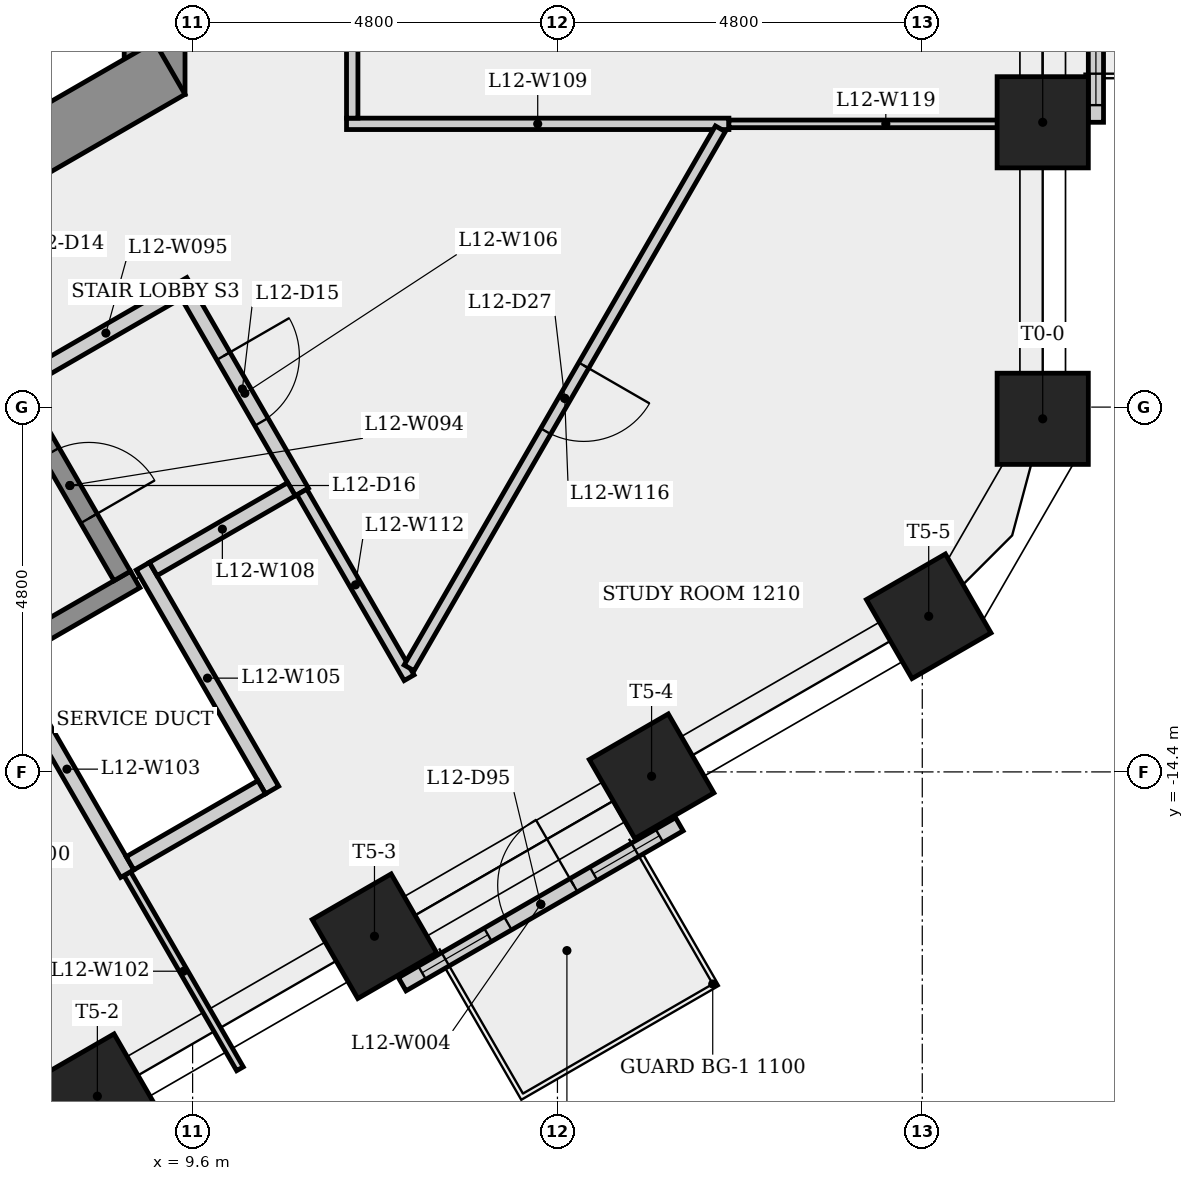
"""IFC4 building model, lengths in metres.
Left out: names, types, materials, properties, quantities, classifications, styles, units other than length and angle.
Written with IfcOpenShell. Run it as: python <this file> out.ifc"""

import sys

from ifc_helpers import new_model, si_unit, direction, frame, frame_2d, origin, origin_2d, place, context, subcontext, project, spatial, rectangle, extrude, element, fill, save


model = new_model("IFC4")
c1 = context("Model", 3, precision=1e-05, world=origin(), true_north=direction((0.0, 1.0)))
c2 = subcontext(c1, "Body", "Model", "MODEL_VIEW")
j1 = project(units=[si_unit("LENGTHUNIT", "METRE"), si_unit("PLANEANGLEUNIT", "RADIAN")], contexts=[c1])
p1 = place(None, origin())
s1 = spatial("IfcSite", under=j1, at=p1, CompositionType="ELEMENT")
p2 = place(p1, origin())
s2 = spatial("IfcBuilding", under=s1, at=p2, CompositionType="ELEMENT")
p3 = place(p2, frame((0.0, 0.0, 49.3)))
s3 = spatial("IfcBuildingStorey", under=s2, at=p3, CompositionType="ELEMENT", Elevation=49.3)
p4 = place(p3, frame((9.1, -5.485, 0.0), z_axis=(0.0, 0.0, 1.0), x_axis=(0.0, 1.0, 0.0)))
e1 = element("IfcWall", 1, at=p4, inside=s3, PredefinedType="SHEAR", context=c2, shape_type="SweptSolid", body=[
    extrude(rectangle(XDim=10.97, YDim=0.8, at=frame_2d((5.485, 0.0))), origin(), (0.0, 0.0, 1.0), 3.4),
])
p5 = place(p4, frame((4.685, 0.0, 0.0)))
e2 = element("IfcOpeningElement", 2, at=p5, cuts=e1, PredefinedType="OPENING", context=c2, shape_type="SweptSolid", body=[
    extrude(rectangle(XDim=1.6, YDim=2.1, at=frame_2d((0.8, 1.05))), frame((0.0, 0.41, 0.0), z_axis=(0.0, -1.0, 0.0), x_axis=(1.0, 0.0, 0.0)), (0.0, 0.0, 1.0), 0.82),
])
p6 = place(p3, frame((-0.2, -10.623, 0.0), z_axis=(0.0, 0.0, 1.0), x_axis=(0.866023993627, 0.500002442456, 0.0)))
e3 = element("IfcWall", 3, at=p6, inside=s3, PredefinedType="SHEAR", context=c2, shape_type="SweptSolid", body=[
    extrude(rectangle(XDim=10.97, YDim=0.8, at=frame_2d((5.485, 0.0))), origin(), (0.0, 0.0, 1.0), 3.4),
])
p7 = place(p6, frame((7.108, 0.0, 0.0)))
e4 = element("IfcOpeningElement", 4, at=p7, cuts=e3, PredefinedType="OPENING", context=c2, shape_type="SweptSolid", body=[
    extrude(rectangle(XDim=0.9, YDim=2.1, at=frame_2d((0.45, 1.05))), frame((0.0, 0.41, 0.0), z_axis=(0.0, -1.0, 0.0), x_axis=(1.0, 0.0, 0.0)), (0.0, 0.0, 1.0), 0.82),
])
for number, where, z_axis, x_axis in (
    (5, (20.785, -9.754, 0.0), (0.0, 0.0, 1.0), (1.0, 0.0, 0.0)),
    (6, (20.785, -5.852, 0.0), (0.0, 0.0, 1.0), (1.0, 0.0, 0.0)),
    (7, (8.347, -18.667, 0.0), (0.0, 0.0, 1.0), (0.5, -0.866, 0.0)),
    (8, (11.993, -16.562, 0.0), (0.0, 0.0, 1.0), (0.5, -0.866, 0.0)),
    (9, (15.639, -14.457, 0.0), (0.0, 0.0, 1.0), (0.5, -0.866, 0.0)),
    (10, (19.285, -12.352, 0.0), (0.0, 0.0, 1.0), (0.5, -0.866, 0.0)),
):
    element("IfcColumn", number, at=place(p3, frame(where, z_axis=z_axis, x_axis=x_axis)), inside=s3, PredefinedType="COLUMN", context=c2, shape_type="SweptSolid", body=[
        extrude(rectangle(XDim=1.2, YDim=1.2, at=origin_2d()), origin(), (0.0, 0.0, 1.0), 3.4),
    ])
p8 = place(p3, frame((12.358, -17.194, 0.0), z_axis=(0.0, 0.0, 1.0), x_axis=(0.866029143232, 0.499993523031, 0.0)))
e11 = element("IfcWall", 11, at=p8, inside=s3, PredefinedType="SOLIDWALL", context=c2, shape_type="SweptSolid", body=[
    extrude(rectangle(XDim=4.21, YDim=0.2, at=frame_2d((2.105, 0.0))), origin(), (0.0, 0.0, 1.0), 3.4),
])
p9 = place(p8, frame((1.605, 0.0, 0.0)))
e12 = element("IfcOpeningElement", 12, at=p9, cuts=e11, PredefinedType="OPENING", context=c2, shape_type="SweptSolid", body=[
    extrude(rectangle(XDim=1.0, YDim=2.4, at=frame_2d((0.5, 1.2))), frame((0.0, 0.11, 0.0), z_axis=(0.0, -1.0, 0.0), x_axis=(1.0, 0.0, 0.0)), (0.0, 0.0, 1.0), 0.22),
])
p10 = place(p8, frame((0.302, 0.0, 0.9)))
e13 = element("IfcOpeningElement", 13, at=p10, cuts=e11, PredefinedType="OPENING", context=c2, shape_type="SweptSolid", body=[
    extrude(rectangle(XDim=1.0, YDim=1.5, at=frame_2d((0.5, 0.75))), frame((0.0, 0.11, 0.0), z_axis=(0.0, -1.0, 0.0), x_axis=(1.0, 0.0, 0.0)), (0.0, 0.0, 1.0), 0.22),
])
p11 = place(p8, frame((2.907, 0.0, 0.9)))
e14 = element("IfcOpeningElement", 14, at=p11, cuts=e11, PredefinedType="OPENING", context=c2, shape_type="SweptSolid", body=[
    extrude(rectangle(XDim=1.0, YDim=1.5, at=frame_2d((0.5, 0.75))), frame((0.0, 0.11, 0.0), z_axis=(0.0, -1.0, 0.0), x_axis=(1.0, 0.0, 0.0)), (0.0, 0.0, 1.0), 0.22),
])
p12 = place(p3, frame((21.485, -5.852, 0.0), z_axis=(0.0, 0.0, 1.0), x_axis=(0.0, 1.0, 0.0)))
e15 = element("IfcWall", 15, at=p12, inside=s3, PredefinedType="SOLIDWALL", context=c2, shape_type="SweptSolid", body=[
    extrude(rectangle(XDim=3.902, YDim=0.2, at=frame_2d((1.951, 0.0))), origin(), (0.0, 0.0, 1.0), 3.4),
])
p13 = place(p12, frame((1.451, 0.0, 0.0)))
e16 = element("IfcOpeningElement", 16, at=p13, cuts=e15, PredefinedType="OPENING", context=c2, shape_type="SweptSolid", body=[
    extrude(rectangle(XDim=1.0, YDim=2.4, at=frame_2d((0.5, 1.2))), frame((0.0, 0.11, 0.0), z_axis=(0.0, -1.0, 0.0), x_axis=(1.0, 0.0, 0.0)), (0.0, 0.0, 1.0), 0.22),
])
p14 = place(p12, frame((0.226, 0.0, 0.9)))
e17 = element("IfcOpeningElement", 17, at=p14, cuts=e15, PredefinedType="OPENING", context=c2, shape_type="SweptSolid", body=[
    extrude(rectangle(XDim=1.0, YDim=1.5, at=frame_2d((0.5, 0.75))), frame((0.0, 0.11, 0.0), z_axis=(0.0, -1.0, 0.0), x_axis=(1.0, 0.0, 0.0)), (0.0, 0.0, 1.0), 0.22),
])
p15 = place(p12, frame((2.677, 0.0, 0.9)))
e18 = element("IfcOpeningElement", 18, at=p15, cuts=e15, PredefinedType="OPENING", context=c2, shape_type="SweptSolid", body=[
    extrude(rectangle(XDim=1.0, YDim=1.5, at=frame_2d((0.5, 0.75))), frame((0.0, 0.11, 0.0), z_axis=(0.0, -1.0, 0.0), x_axis=(1.0, 0.0, 0.0)), (0.0, 0.0, 1.0), 0.22),
])
p16 = place(p3, frame((3.301, -15.068, 0.0), z_axis=(0.0, 0.0, 1.0), x_axis=(0.866035036182, 0.499983315828, 0.0)))
e19 = element("IfcWall", 19, at=p16, inside=s3, PredefinedType="SHEAR", context=c2, shape_type="SweptSolid", body=[
    extrude(rectangle(XDim=6.4, YDim=0.25, at=frame_2d((3.2, 0.0))), origin(), (0.0, 0.0, 1.0), 3.05),
])
p17 = place(p3, frame((7.298, -9.441, 0.0), z_axis=(0.0, 0.0, 1.0), x_axis=(0.500034990121, -0.866005201286, 0.0)))
e20 = element("IfcWall", 20, at=p17, inside=s3, PredefinedType="SHEAR", context=c2, shape_type="SweptSolid", body=[
    extrude(rectangle(XDim=2.75, YDim=0.25, at=frame_2d((1.375, 0.0))), origin(), (0.0, 0.0, 1.0), 3.05),
])
p18 = place(p17, frame((0.875, 0.0, 0.0)))
e21 = element("IfcOpeningElement", 21, at=p18, cuts=e20, PredefinedType="OPENING", context=c2, shape_type="SweptSolid", body=[
    extrude(rectangle(XDim=1.0, YDim=2.1, at=frame_2d((0.5, 1.05))), frame((0.0, 0.135, 0.0), z_axis=(0.0, -1.0, 0.0), x_axis=(1.0, 0.0, 0.0)), (0.0, 0.0, 1.0), 0.27),
])
p19 = place(p3, frame((7.344, -9.27, 0.0), z_axis=(0.0, 0.0, 1.0), x_axis=(0.866005588531, 0.500034319456, 0.0)))
e22 = element("IfcWall", 22, at=p19, inside=s3, PredefinedType="PARTITIONING", context=c2, shape_type="SweptSolid", body=[
    extrude(rectangle(XDim=2.575, YDim=0.2, at=frame_2d((1.288, 0.0))), origin(), (0.0, 0.0, 1.0), 3.05),
])
p20 = place(p3, frame((8.74, -15.738, 0.0), z_axis=(0.0, 0.0, 1.0), x_axis=(0.500052637874, -0.865995011161, 0.0)))
e23 = element("IfcWall", 23, at=p20, inside=s3, PredefinedType="PARTITIONING", context=c2, shape_type="SweptSolid", body=[
    extrude(rectangle(XDim=2.966, YDim=0.1, at=frame_2d((1.483, 0.0))), origin(), (0.0, 0.0, 1.0), 3.05),
])
p21 = place(p3, frame((8.74, -15.739, 0.0), z_axis=(0.0, 0.0, 1.0), x_axis=(-0.500017526161, 0.866015284814, 0.0)))
e24 = element("IfcWall", 24, at=p21, inside=s3, PredefinedType="PLUMBINGWALL", context=c2, shape_type="SweptSolid", body=[
    extrude(rectangle(XDim=3.175, YDim=0.2, at=frame_2d((1.588, 0.0))), origin(), (0.0, 0.0, 1.0), 3.05),
])
p22 = place(p3, frame((8.945, -11.694, 0.0), z_axis=(0.0, 0.0, 1.0), x_axis=(0.500062241894, -0.865989465428, 0.0)))
e25 = element("IfcWall", 25, at=p22, inside=s3, PredefinedType="PLUMBINGWALL", context=c2, shape_type="SweptSolid", body=[
    extrude(rectangle(XDim=3.4, YDim=0.2, at=frame_2d((1.7, 0.0))), origin(), (0.0, 0.0, 1.0), 3.05),
])
p23 = place(p3, frame((9.537, -8.119, 0.0), z_axis=(0.0, 0.0, 1.0), x_axis=(0.499990139034, -0.866031096941, 0.0)))
e26 = element("IfcWall", 26, at=p23, inside=s3, PredefinedType="PARTITIONING", context=c2, shape_type="SweptSolid", body=[
    extrude(rectangle(XDim=3.0, YDim=0.2, at=frame_2d((1.5, 0.0))), origin(), (0.0, 0.0, 1.0), 3.05),
])
p24 = place(p23, frame((0.935, 0.0, 0.0)))
e27 = element("IfcOpeningElement", 27, at=p24, cuts=e26, PredefinedType="OPENING", context=c2, shape_type="SweptSolid", body=[
    extrude(rectangle(XDim=1.0, YDim=2.1, at=frame_2d((0.5, 1.05))), frame((0.0, 0.11, 0.0), z_axis=(0.0, -1.0, 0.0), x_axis=(1.0, 0.0, 0.0)), (0.0, 0.0, 1.0), 0.22),
])
p25 = place(p3, frame((10.509, -14.602, 0.0), z_axis=(0.0, 0.0, 1.0), x_axis=(-0.866010750942, -0.50002537861, 0.0)))
e28 = element("IfcWall", 28, at=p25, inside=s3, PredefinedType="PLUMBINGWALL", context=c2, shape_type="SweptSolid", body=[
    extrude(rectangle(XDim=2.0, YDim=0.2, at=frame_2d((1.0, 0.0))), origin(), (0.0, 0.0, 1.0), 3.05),
])
p26 = place(p3, frame((10.901, -10.681, 0.0), z_axis=(0.0, 0.0, 1.0), x_axis=(-0.866009402589, -0.500027713859, 0.0)))
e29 = element("IfcWall", 29, at=p26, inside=s3, PredefinedType="PARTITIONING", context=c2, shape_type="SweptSolid", body=[
    extrude(rectangle(XDim=2.1, YDim=0.2, at=frame_2d((1.05, 0.0))), origin(), (0.0, 0.0, 1.0), 3.05),
])
p27 = place(p3, frame((11.625, -5.873, 0.0), z_axis=(0.0, 0.0, 1.0), x_axis=(1.0, 0.0, 0.0)))
e30 = element("IfcWall", 30, at=p27, inside=s3, PredefinedType="PARTITIONING", context=c2, shape_type="SweptSolid", body=[
    extrude(rectangle(XDim=5.031, YDim=0.15, at=frame_2d((2.516, 0.0))), origin(), (0.0, 0.0, 1.0), 3.05),
])
p28 = place(p3, frame((11.7, 5.873, 0.0), z_axis=(0.0, 0.0, 1.0), x_axis=(0.0, -1.0, 0.0)))
e31 = element("IfcWall", 31, at=p28, inside=s3, PredefinedType="PARTITIONING", context=c2, shape_type="SweptSolid", body=[
    extrude(rectangle(XDim=11.671, YDim=0.15, at=frame_2d((5.835, 0.0))), origin(), (0.0, 0.0, 1.0), 3.05),
])
p29 = place(p28, frame((5.336, 0.0, 0.0)))
e32 = element("IfcOpeningElement", 32, at=p29, cuts=e31, PredefinedType="OPENING", context=c2, shape_type="SweptSolid", body=[
    extrude(rectangle(XDim=1.0, YDim=2.1, at=frame_2d((0.5, 1.05))), frame((0.0, 0.085, 0.0), z_axis=(0.0, -1.0, 0.0), x_axis=(1.0, 0.0, 0.0)), (0.0, 0.0, 1.0), 0.17),
])
p30 = place(p3, frame((12.448, -13.161, 0.0), z_axis=(0.0, 0.0, 1.0), x_axis=(-0.499982078236, 0.866035750673, 0.0)))
e33 = element("IfcWall", 33, at=p30, inside=s3, PredefinedType="PARTITIONING", context=c2, shape_type="SweptSolid", body=[
    extrude(rectangle(XDim=2.822, YDim=0.15, at=frame_2d((1.411, 0.0))), origin(), (0.0, 0.0, 1.0), 3.05),
])
p31 = place(p3, frame((16.543, -5.938, 0.0), z_axis=(0.0, 0.0, 1.0), x_axis=(-0.500005424275, -0.866022272055, 0.0)))
e34 = element("IfcWall", 34, at=p31, inside=s3, PredefinedType="PARTITIONING", context=c2, shape_type="SweptSolid", body=[
    extrude(rectangle(XDim=8.19, YDim=0.15, at=frame_2d((4.095, 0.0))), origin(), (0.0, 0.0, 1.0), 3.05),
])
p32 = place(p31, frame((3.595, 0.0, 0.0)))
e35 = element("IfcOpeningElement", 35, at=p32, cuts=e34, PredefinedType="OPENING", context=c2, shape_type="SweptSolid", body=[
    extrude(rectangle(XDim=1.0, YDim=2.1, at=frame_2d((0.5, 1.05))), frame((0.0, 0.085, 0.0), z_axis=(0.0, -1.0, 0.0), x_axis=(1.0, 0.0, 0.0)), (0.0, 0.0, 1.0), 0.17),
])
p33 = place(p3, frame((20.785, -5.873, 0.0), z_axis=(0.0, 0.0, 1.0), x_axis=(-1.0, 0.0, 0.0)))
e36 = element("IfcWall", 36, at=p33, inside=s3, PredefinedType="PARTITIONING", context=c2, shape_type="SweptSolid", body=[
    extrude(rectangle(XDim=4.129, YDim=0.1, at=frame_2d((2.064, 0.0))), origin(), (0.0, 0.0, 1.0), 3.05),
])
p34 = place(p9, origin())
e37 = element("IfcDoor", 37, at=p34, inside=s3, OperationType="SINGLE_SWING_RIGHT", PredefinedType="DOOR", context=c2, shape_type="SweptSolid", body=[
    extrude(rectangle(XDim=1.0, YDim=2.4, at=frame_2d((0.5, 1.2))), frame((0.0, 0.025, 0.0), z_axis=(0.0, -1.0, 0.0), x_axis=(1.0, 0.0, 0.0)), (0.0, 0.0, 1.0), 0.05),
])
fill(e12, e37)
p35 = place(p10, origin())
e38 = element("IfcWindow", 38, at=p35, inside=s3, PartitioningType="SINGLE_PANEL", PredefinedType="WINDOW", context=c2, shape_type="SweptSolid", body=[
    extrude(rectangle(XDim=1.0, YDim=1.5, at=frame_2d((0.5, 0.75))), frame((0.0, 0.03, 0.0), z_axis=(0.0, -1.0, 0.0), x_axis=(1.0, 0.0, 0.0)), (0.0, 0.0, 1.0), 0.06),
])
fill(e13, e38)
p36 = place(p11, origin())
e39 = element("IfcWindow", 39, at=p36, inside=s3, PartitioningType="SINGLE_PANEL", PredefinedType="WINDOW", context=c2, shape_type="SweptSolid", body=[
    extrude(rectangle(XDim=1.0, YDim=1.5, at=frame_2d((0.5, 0.75))), frame((0.0, 0.03, 0.0), z_axis=(0.0, -1.0, 0.0), x_axis=(1.0, 0.0, 0.0)), (0.0, 0.0, 1.0), 0.06),
])
fill(e14, e39)
p37 = place(p14, origin())
e40 = element("IfcWindow", 40, at=p37, inside=s3, PartitioningType="SINGLE_PANEL", PredefinedType="WINDOW", context=c2, shape_type="SweptSolid", body=[
    extrude(rectangle(XDim=1.0, YDim=1.5, at=frame_2d((0.5, 0.75))), frame((0.0, 0.03, 0.0), z_axis=(0.0, -1.0, 0.0), x_axis=(1.0, 0.0, 0.0)), (0.0, 0.0, 1.0), 0.06),
])
fill(e17, e40)
p38 = place(p24, origin())
e41 = element("IfcDoor", 41, at=p38, inside=s3, OperationType="SINGLE_SWING_LEFT", PredefinedType="DOOR", context=c2, shape_type="SweptSolid", body=[
    extrude(rectangle(XDim=1.0, YDim=2.1, at=frame_2d((0.5, 1.05))), frame((0.0, 0.025, 0.0), z_axis=(0.0, -1.0, 0.0), x_axis=(1.0, 0.0, 0.0)), (0.0, 0.0, 1.0), 0.05),
])
fill(e27, e41)
p39 = place(p18, origin())
e42 = element("IfcDoor", 42, at=p39, inside=s3, OperationType="SINGLE_SWING_RIGHT", PredefinedType="DOOR", context=c2, shape_type="SweptSolid", body=[
    extrude(rectangle(XDim=1.0, YDim=2.1, at=frame_2d((0.5, 1.05))), frame((0.0, 0.025, 0.0), z_axis=(0.0, -1.0, 0.0), x_axis=(1.0, 0.0, 0.0)), (0.0, 0.0, 1.0), 0.05),
])
fill(e21, e42)
p40 = place(p32, origin())
e43 = element("IfcDoor", 43, at=p40, inside=s3, OperationType="SINGLE_SWING_LEFT", PredefinedType="DOOR", context=c2, shape_type="SweptSolid", body=[
    extrude(rectangle(XDim=1.0, YDim=2.1, at=frame_2d((0.5, 1.05))), frame((0.0, 0.025, 0.0), z_axis=(0.0, -1.0, 0.0), x_axis=(1.0, 0.0, 0.0)), (0.0, 0.0, 1.0), 0.05),
])
fill(e35, e43)
save(model, sys.argv[1])
